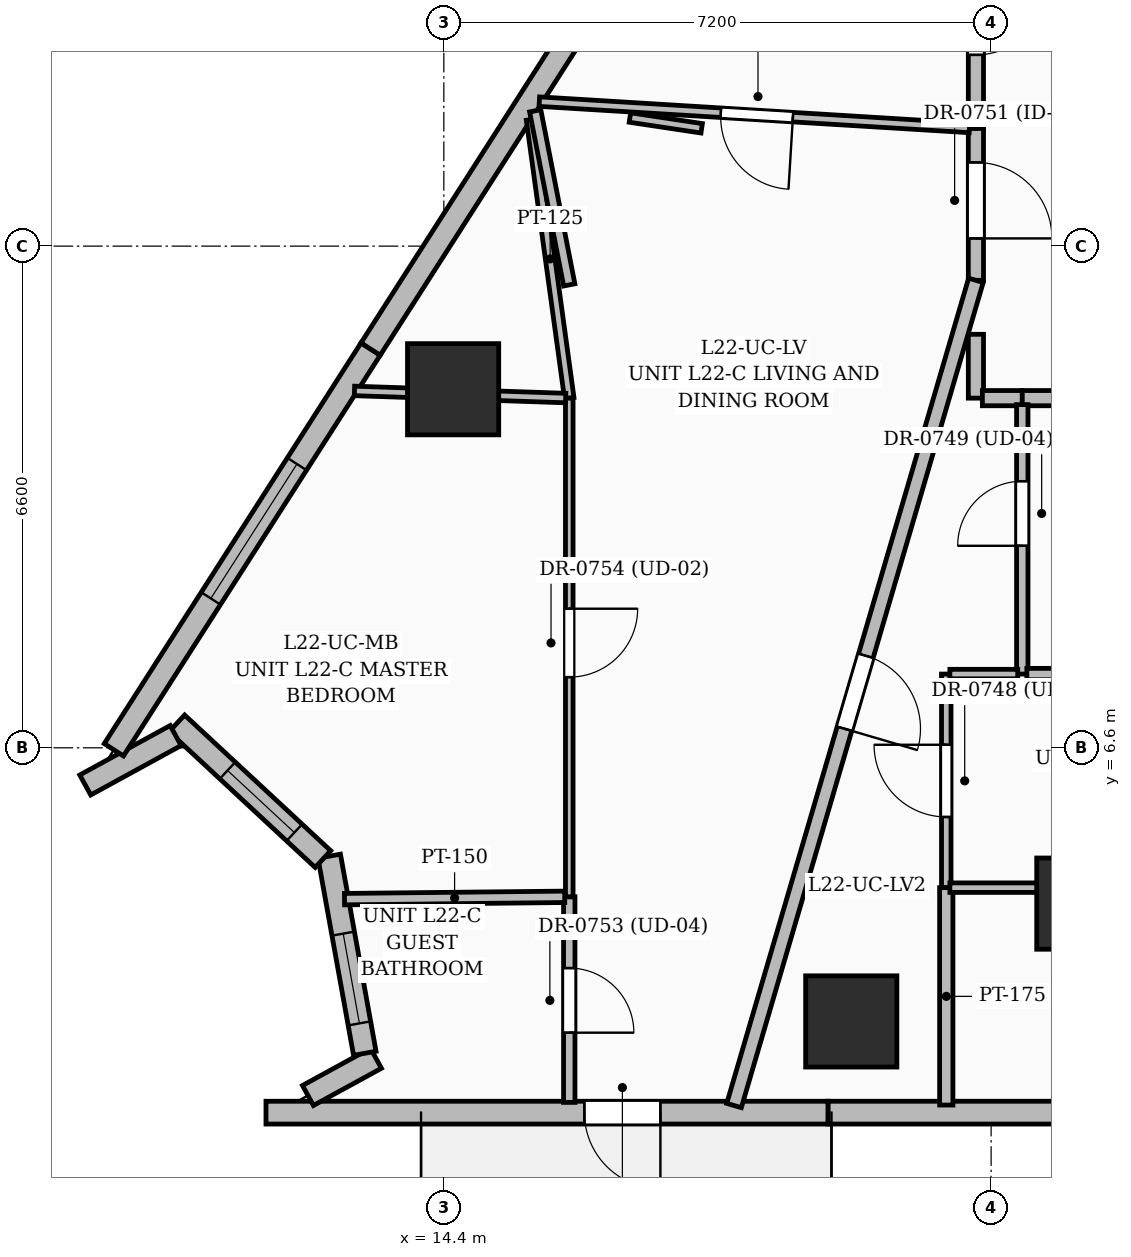
"""IFC4 building model, lengths in metres.
Left out: names, types, materials, properties, quantities, classifications, styles, units other than length and angle.
Written with IfcOpenShell. Run it as: python <this file> out.ifc"""

import sys

from ifc_helpers import new_model, si_unit, direction, frame, frame_2d, origin, origin_2d, place, context, subcontext, project, spatial, rectangle, extrude, element, fill, save


model = new_model("IFC4")
c1 = context("Model", 3, precision=1e-05, world=origin(), true_north=direction((0.0, 1.0)))
c2 = subcontext(c1, "Body", "Model", "MODEL_VIEW")
j1 = project(units=[si_unit("LENGTHUNIT", "METRE"), si_unit("PLANEANGLEUNIT", "RADIAN")], contexts=[c1])
p1 = place(None, origin())
s1 = spatial("IfcSite", under=j1, at=p1, CompositionType="ELEMENT")
p2 = place(p1, origin())
s2 = spatial("IfcBuilding", under=s1, at=p2, CompositionType="ELEMENT")
p3 = place(p2, frame((0.0, 0.0, 89.4)))
s3 = spatial("IfcBuildingStorey", under=s2, at=p3, CompositionType="ELEMENT", Elevation=89.4)
for number, where, z_axis, x_axis in (
    (1, (22.8, 4.55, 0.0), (0.0, 0.0, 1.0), (1.0, 0.0, 0.0)),
    (2, (19.76, 3.0, 0.0), (0.0, 0.0, 1.0), (1.0, 0.0, 0.0)),
    (3, (14.522, 11.317, 0.0), (0.0, 0.0, 1.0), (1.0, 0.0, 0.0)),
):
    element("IfcColumn", number, at=place(p3, frame(where, z_axis=z_axis, x_axis=x_axis)), inside=s3, PredefinedType="COLUMN", context=c2, shape_type="SweptSolid", body=[
        extrude(rectangle(XDim=1.2, YDim=1.2, at=origin_2d()), origin(), (0.0, 0.0, 1.0), 3.6),
    ])
p4 = place(p3, frame((26.847, 1.8, 0.0), z_axis=(0.0, 0.0, 1.0), x_axis=(-1.0, 0.0, 0.0)))
e4 = element("IfcWall", 4, at=p4, inside=s3, PredefinedType="SOLIDWALL", context=c2, shape_type="SweptSolid", body=[
    extrude(rectangle(XDim=7.393, YDim=0.3, at=frame_2d((3.697, 0.0))), origin(), (0.0, 0.0, 1.0), 3.35),
])
p5 = place(p4, frame((1.975, 0.0, 0.55)))
e5 = element("IfcOpeningElement", 5, at=p5, cuts=e4, PredefinedType="OPENING", context=c2, shape_type="SweptSolid", body=[
    extrude(rectangle(XDim=2.1, YDim=2.4, at=frame_2d((1.05, 1.2))), frame((0.0, 0.16, 0.0), z_axis=(0.0, -1.0, 0.0), x_axis=(1.0, 0.0, 0.0)), (0.0, 0.0, 1.0), 0.32),
])
p6 = place(p3, frame((19.453, 1.8, 0.0), z_axis=(0.0, 0.0, 1.0), x_axis=(-1.0, 0.0, 0.0)))
e6 = element("IfcWall", 6, at=p6, inside=s3, PredefinedType="SOLIDWALL", context=c2, shape_type="SweptSolid", body=[
    extrude(rectangle(XDim=7.393, YDim=0.3, at=frame_2d((3.697, 0.0))), origin(), (0.0, 0.0, 1.0), 3.35),
])
p7 = place(p6, frame((2.204, 0.0, 0.0)))
e7 = element("IfcOpeningElement", 7, at=p7, cuts=e6, PredefinedType="OPENING", context=c2, shape_type="SweptSolid", body=[
    extrude(rectangle(XDim=1.0, YDim=2.2, at=frame_2d((0.5, 1.1))), frame((0.0, 0.16, 0.0), z_axis=(0.0, -1.0, 0.0), x_axis=(1.0, 0.0, 0.0)), (0.0, 0.0, 1.0), 0.32),
])
p8 = place(p3, frame((12.612, 2.026, 0.0), z_axis=(0.0, 0.0, 1.0), x_axis=(0.877245120991, 0.480042704036, 0.0)))
e8 = element("IfcWall", 8, at=p8, inside=s3, PredefinedType="SOLIDWALL", context=c2, shape_type="SweptSolid", body=[
    extrude(rectangle(XDim=1.02, YDim=0.3, at=frame_2d((0.51, 0.0))), origin(), (0.0, 0.0, 1.0), 3.35),
])
p9 = place(p3, frame((13.36, 2.581, 0.0), z_axis=(0.0, 0.0, 1.0), x_axis=(-0.177621463404, 0.984098885142, 0.0)))
e9 = element("IfcWall", 9, at=p9, inside=s3, PredefinedType="SOLIDWALL", context=c2, shape_type="SweptSolid", body=[
    extrude(rectangle(XDim=2.635, YDim=0.3, at=frame_2d((1.317, 0.0))), origin(), (0.0, 0.0, 1.0), 3.35),
])
p10 = place(p9, frame((0.4, 0.0, 0.8)))
e10 = element("IfcOpeningElement", 10, at=p10, cuts=e9, PredefinedType="OPENING", context=c2, shape_type="SweptSolid", body=[
    extrude(rectangle(XDim=1.2, YDim=1.8, at=frame_2d((0.6, 0.9))), frame((0.0, 0.16, 0.0), z_axis=(0.0, -1.0, 0.0), x_axis=(1.0, 0.0, 0.0)), (0.0, 0.0, 1.0), 0.32),
])
p11 = place(p3, frame((12.809, 5.136, 0.0), z_axis=(0.0, 0.0, 1.0), x_axis=(-0.732640992678, 0.680615292105, 0.0)))
e11 = element("IfcWall", 11, at=p11, inside=s3, PredefinedType="SOLIDWALL", context=c2, shape_type="SweptSolid", body=[
    extrude(rectangle(XDim=2.623, YDim=0.3, at=frame_2d((1.312, 0.0))), origin(), (0.0, 0.0, 1.0), 3.35),
])
p12 = place(p11, frame((0.513, 0.0, 0.8)))
e12 = element("IfcOpeningElement", 12, at=p12, cuts=e11, PredefinedType="OPENING", context=c2, shape_type="SweptSolid", body=[
    extrude(rectangle(XDim=1.2, YDim=1.8, at=frame_2d((0.6, 0.9))), frame((0.0, 0.16, 0.0), z_axis=(0.0, -1.0, 0.0), x_axis=(1.0, 0.0, 0.0)), (0.0, 0.0, 1.0), 0.32),
])
p13 = place(p3, frame((10.872, 6.761, 0.0), z_axis=(0.0, 0.0, 1.0), x_axis=(-0.877399567967, -0.479760354898, 0.0)))
e13 = element("IfcWall", 13, at=p13, inside=s3, PredefinedType="SOLIDWALL", context=c2, shape_type="SweptSolid", body=[
    extrude(rectangle(XDim=1.356, YDim=0.3, at=frame_2d((0.678, 0.0))), origin(), (0.0, 0.0, 1.0), 3.35),
])
p14 = place(p3, frame((10.059, 6.574, 0.0), z_axis=(0.0, 0.0, 1.0), x_axis=(0.539474072839, 0.842002211835, 0.0)))
e14 = element("IfcWall", 14, at=p14, inside=s3, PredefinedType="SOLIDWALL", context=c2, shape_type="SweptSolid", body=[
    extrude(rectangle(XDim=6.261, YDim=0.3, at=frame_2d((3.131, 0.0))), origin(), (0.0, 0.0, 1.0), 3.35),
])
p15 = place(p14, frame((2.365, 0.0, 0.55)))
e15 = element("IfcOpeningElement", 15, at=p15, cuts=e14, PredefinedType="OPENING", context=c2, shape_type="SweptSolid", body=[
    extrude(rectangle(XDim=2.1, YDim=2.4, at=frame_2d((1.05, 1.2))), frame((0.0, 0.16, 0.0), z_axis=(0.0, -1.0, 0.0), x_axis=(1.0, 0.0, 0.0)), (0.0, 0.0, 1.0), 0.32),
])
p16 = place(p3, frame((13.437, 11.846, 0.0), z_axis=(0.0, 0.0, 1.0), x_axis=(0.539467581629, 0.842006370743, 0.0)))
e16 = element("IfcWall", 16, at=p16, inside=s3, PredefinedType="SOLIDWALL", context=c2, shape_type="SweptSolid", body=[
    extrude(rectangle(XDim=7.13, YDim=0.3, at=frame_2d((3.565, 0.0))), origin(), (0.0, 0.0, 1.0), 3.35),
])
p17 = place(p3, frame((21.4, 12.04, 0.0), z_axis=(0.0, 0.0, 1.0), x_axis=(0.0, -1.0, 0.0)))
e17 = element("IfcWall", 17, at=p17, inside=s3, PredefinedType="PARTITIONING", context=c2, shape_type="SweptSolid", body=[
    extrude(rectangle(XDim=0.84, YDim=0.2, at=frame_2d((0.42, 0.0))), origin(), (0.0, 0.0, 1.0), 3.35),
])
p18 = place(p3, frame((21.485, 11.2, 0.0), z_axis=(0.0, 0.0, 1.0), x_axis=(1.0, 0.0, 0.0)))
e18 = element("IfcWall", 18, at=p18, inside=s3, PredefinedType="PARTITIONING", context=c2, shape_type="SweptSolid", body=[
    extrude(rectangle(XDim=0.525, YDim=0.2, at=frame_2d((0.262, 0.0))), origin(), (0.0, 0.0, 1.0), 3.35),
])
p19 = place(p3, frame((22.01, 11.2, 0.0), z_axis=(0.0, 0.0, 1.0), x_axis=(1.0, 0.0, 0.0)))
e19 = element("IfcWall", 19, at=p19, inside=s3, PredefinedType="PARTITIONING", context=c2, shape_type="SweptSolid", body=[
    extrude(rectangle(XDim=2.859, YDim=0.2, at=frame_2d((1.43, 0.0))), origin(), (0.0, 0.0, 1.0), 3.35),
])
p20 = place(p3, frame((21.4, 14.75, 0.0), z_axis=(0.0, 0.0, 1.0), x_axis=(0.0, -1.0, 0.0)))
e20 = element("IfcWall", 20, at=p20, inside=s3, PredefinedType="PARTITIONING", context=c2, shape_type="SweptSolid", body=[
    extrude(rectangle(XDim=2.0, YDim=0.2, at=frame_2d((1.0, 0.0))), origin(), (0.0, 0.0, 1.0), 2.771),
])
p21 = place(p20, frame((0.448, 0.0, 0.0)))
e21 = element("IfcOpeningElement", 21, at=p21, cuts=e20, PredefinedType="OPENING", context=c2, shape_type="SweptSolid", body=[
    extrude(rectangle(XDim=1.0, YDim=2.2, at=frame_2d((0.5, 1.1))), frame((0.0, 0.11, 0.0), z_axis=(0.0, -1.0, 0.0), x_axis=(1.0, 0.0, 0.0)), (0.0, 0.0, 1.0), 0.22),
])
p22 = place(p3, frame((21.4, 17.75, 0.0), z_axis=(0.0, 0.0, 1.0), x_axis=(0.0, -1.0, 0.0)))
e22 = element("IfcWall", 22, at=p22, inside=s3, PredefinedType="PARTITIONING", context=c2, shape_type="SweptSolid", body=[
    extrude(rectangle(XDim=3.0, YDim=0.2, at=frame_2d((1.5, 0.0))), origin(), (0.0, 0.0, 1.0), 2.771),
])
p23 = place(p22, frame((1.084, 0.0, 0.0)))
e23 = element("IfcOpeningElement", 23, at=p23, cuts=e22, PredefinedType="OPENING", context=c2, shape_type="SweptSolid", body=[
    extrude(rectangle(XDim=0.95, YDim=2.2, at=frame_2d((0.475, 1.1))), frame((0.0, 0.11, 0.0), z_axis=(0.0, -1.0, 0.0), x_axis=(1.0, 0.0, 0.0)), (0.0, 0.0, 1.0), 0.22),
])
p24 = place(p3, frame((22.01, 7.57, 0.0), z_axis=(0.0, 0.0, 1.0), x_axis=(0.0, 1.0, 0.0)))
e24 = element("IfcWall", 24, at=p24, inside=s3, PredefinedType="PARTITIONING", context=c2, shape_type="SweptSolid", body=[
    extrude(rectangle(XDim=3.545, YDim=0.15, at=frame_2d((1.772, 0.0))), origin(), (0.0, 0.0, 1.0), 2.345),
])
p25 = place(p24, frame((1.688, 0.0, 0.0)))
e25 = element("IfcOpeningElement", 25, at=p25, cuts=e24, PredefinedType="OPENING", context=c2, shape_type="SweptSolid", body=[
    extrude(rectangle(XDim=0.85, YDim=2.1, at=frame_2d((0.425, 1.05))), frame((0.0, 0.085, 0.0), z_axis=(0.0, -1.0, 0.0), x_axis=(1.0, 0.0, 0.0)), (0.0, 0.0, 1.0), 0.17),
])
p26 = place(p3, frame((21.01, 4.76, 0.0), z_axis=(0.0, 0.0, 1.0), x_axis=(0.0, 1.0, 0.0)))
e26 = element("IfcWall", 26, at=p26, inside=s3, PredefinedType="PARTITIONING", context=c2, shape_type="SweptSolid", body=[
    extrude(rectangle(XDim=2.81, YDim=0.125, at=frame_2d((1.405, 0.0))), origin(), (0.0, 0.0, 1.0), 3.35),
])
p27 = place(p26, frame((0.93, 0.0, 0.0)))
e27 = element("IfcOpeningElement", 27, at=p27, cuts=e26, PredefinedType="OPENING", context=c2, shape_type="SweptSolid", body=[
    extrude(rectangle(XDim=0.95, YDim=2.2, at=frame_2d((0.475, 1.1))), frame((0.0, 0.072, 0.0), z_axis=(0.0, -1.0, 0.0), x_axis=(1.0, 0.0, 0.0)), (0.0, 0.0, 1.0), 0.145),
])
p28 = place(p3, frame((21.058, 7.57, 0.0), z_axis=(0.0, 0.0, 1.0), x_axis=(1.0, 0.0, 0.0)))
e28 = element("IfcWall", 28, at=p28, inside=s3, PredefinedType="PARTITIONING", context=c2, shape_type="SweptSolid", body=[
    extrude(rectangle(XDim=0.892, YDim=0.125, at=frame_2d((0.446, 0.0))), origin(), (0.0, 0.0, 1.0), 2.771),
])
p29 = place(p3, frame((21.01, 1.9, 0.0), z_axis=(0.0, 0.0, 1.0), x_axis=(0.0, 1.0, 0.0)))
e29 = element("IfcWall", 29, at=p29, inside=s3, PredefinedType="PARTITIONING", context=c2, shape_type="SweptSolid", body=[
    extrude(rectangle(XDim=2.86, YDim=0.175, at=frame_2d((1.43, 0.0))), origin(), (0.0, 0.0, 1.0), 2.345),
])
p30 = place(p3, frame((21.4, 12.75, 0.0), z_axis=(0.0, 0.0, 1.0), x_axis=(-0.281267694056, -0.959629347342, 0.0)))
e30 = element("IfcWall", 30, at=p30, inside=s3, PredefinedType="PARTITIONING", context=c2, shape_type="SweptSolid", body=[
    extrude(rectangle(XDim=11.313, YDim=0.2, at=frame_2d((5.656, 0.0))), origin(), (0.0, 0.0, 1.0), 2.345),
])
p31 = place(p30, frame((5.147, 0.0, 0.0)))
e31 = element("IfcOpeningElement", 31, at=p31, cuts=e30, PredefinedType="OPENING", context=c2, shape_type="SweptSolid", body=[
    extrude(rectangle(XDim=1.0, YDim=2.2, at=frame_2d((0.5, 1.1))), frame((0.0, 0.11, 0.0), z_axis=(0.0, -1.0, 0.0), x_axis=(1.0, 0.0, 0.0)), (0.0, 0.0, 1.0), 0.22),
])
p32 = place(p3, frame((22.07, 7.57, 0.0), z_axis=(0.0, 0.0, 1.0), x_axis=(1.0, 0.0, 0.0)))
e32 = element("IfcWall", 32, at=p32, inside=s3, PredefinedType="PARTITIONING", context=c2, shape_type="SweptSolid", body=[
    extrude(rectangle(XDim=2.795, YDim=0.15, at=frame_2d((1.397, 0.0))), origin(), (0.0, 0.0, 1.0), 3.35),
])
p33 = place(p3, frame((21.058, 4.76, 0.0), z_axis=(0.0, 0.0, 1.0), x_axis=(1.0, 0.0, 0.0)))
e33 = element("IfcWall", 33, at=p33, inside=s3, PredefinedType="PARTITIONING", context=c2, shape_type="SweptSolid", body=[
    extrude(rectangle(XDim=6.042, YDim=0.125, at=frame_2d((3.021, 0.0))), origin(), (0.0, 0.0, 1.0), 2.309),
])
p34 = place(p33, frame((2.488, 0.0, 0.0)))
e34 = element("IfcOpeningElement", 34, at=p34, cuts=e33, PredefinedType="OPENING", context=c2, shape_type="SweptSolid", body=[
    extrude(rectangle(XDim=0.9, YDim=2.15, at=frame_2d((0.45, 1.075))), frame((0.0, 0.072, 0.0), z_axis=(0.0, -1.0, 0.0), x_axis=(1.0, 0.0, 0.0)), (0.0, 0.0, 1.0), 0.145),
])
p35 = place(p3, frame((16.05, 4.64, 0.0), z_axis=(0.0, 0.0, 1.0), x_axis=(0.0, -1.0, 0.0)))
e35 = element("IfcWall", 35, at=p35, inside=s3, PredefinedType="PARTITIONING", context=c2, shape_type="SweptSolid", body=[
    extrude(rectangle(XDim=2.705, YDim=0.15, at=frame_2d((1.353, 0.0))), origin(), (0.0, 0.0, 1.0), 3.35),
])
p36 = place(p35, frame((0.938, 0.0, 0.0)))
e36 = element("IfcOpeningElement", 36, at=p36, cuts=e35, PredefinedType="OPENING", context=c2, shape_type="SweptSolid", body=[
    extrude(rectangle(XDim=0.85, YDim=2.1, at=frame_2d((0.425, 1.05))), frame((0.0, 0.085, 0.0), z_axis=(0.0, -1.0, 0.0), x_axis=(1.0, 0.0, 0.0)), (0.0, 0.0, 1.0), 0.17),
])
p37 = place(p3, frame((21.315, 14.755, 0.0), z_axis=(0.0, 0.0, 1.0), x_axis=(-0.99813414118, 0.061059284391, 0.0)))
e37 = element("IfcWall", 37, at=p37, inside=s3, PredefinedType="PARTITIONING", context=c2, shape_type="SweptSolid", body=[
    extrude(rectangle(XDim=5.67, YDim=0.125, at=frame_2d((2.835, 0.0))), origin(), (0.0, 0.0, 1.0), 2.37),
])
p38 = place(p37, frame((2.327, 0.0, 0.0)))
e38 = element("IfcOpeningElement", 38, at=p38, cuts=e37, PredefinedType="OPENING", context=c2, shape_type="SweptSolid", body=[
    extrude(rectangle(XDim=0.95, YDim=2.2, at=frame_2d((0.475, 1.1))), frame((0.0, 0.072, 0.0), z_axis=(0.0, -1.0, 0.0), x_axis=(1.0, 0.0, 0.0)), (0.0, 0.0, 1.0), 0.145),
])
p39 = place(p3, frame((15.547, 14.865, 0.0), z_axis=(0.0, 0.0, 1.0), x_axis=(0.135967318148, -0.990713323013, 0.0)))
e39 = element("IfcWall", 39, at=p39, inside=s3, PredefinedType="PARTITIONING", context=c2, shape_type="SweptSolid", body=[
    extrude(rectangle(XDim=3.699, YDim=0.125, at=frame_2d((1.85, 0.0))), origin(), (0.0, 0.0, 1.0), 2.37),
])
p40 = place(p3, frame((16.05, 11.2, 0.0), z_axis=(0.0, 0.0, 1.0), x_axis=(0.0, -1.0, 0.0)))
e40 = element("IfcWall", 40, at=p40, inside=s3, PredefinedType="PARTITIONING", context=c2, shape_type="SweptSolid", body=[
    extrude(rectangle(XDim=6.56, YDim=0.1, at=frame_2d((3.28, 0.0))), origin(), (0.0, 0.0, 1.0), 2.345),
])
p41 = place(p40, frame((2.77, 0.0, 0.0)))
e41 = element("IfcOpeningElement", 41, at=p41, cuts=e40, PredefinedType="OPENING", context=c2, shape_type="SweptSolid", body=[
    extrude(rectangle(XDim=0.9, YDim=2.15, at=frame_2d((0.45, 1.075))), frame((0.0, 0.06, 0.0), z_axis=(0.0, -1.0, 0.0), x_axis=(1.0, 0.0, 0.0)), (0.0, 0.0, 1.0), 0.12),
])
p42 = place(p3, frame((15.99, 4.639, 0.0), z_axis=(0.0, 0.0, 1.0), x_axis=(-0.999944518883, -0.010533715225, 0.0)))
e42 = element("IfcWall", 42, at=p42, inside=s3, PredefinedType="PARTITIONING", context=c2, shape_type="SweptSolid", body=[
    extrude(rectangle(XDim=2.897, YDim=0.15, at=frame_2d((1.449, 0.0))), origin(), (0.0, 0.0, 1.0), 3.35),
])
p43 = place(p3, frame((13.224, 11.295, 0.0), z_axis=(0.0, 0.0, 1.0), x_axis=(0.999434133118, -0.033636491475, 0.0)))
e43 = element("IfcWall", 43, at=p43, inside=s3, PredefinedType="PARTITIONING", context=c2, shape_type="SweptSolid", body=[
    extrude(rectangle(XDim=2.78, YDim=0.125, at=frame_2d((1.39, 0.0))), origin(), (0.0, 0.0, 1.0), 2.345),
])
p44 = place(p3, frame((17.792, 14.75, 0.0), z_axis=(0.0, 0.0, 1.0), x_axis=(-0.988863080903, 0.14882811303, 0.0)))
e44 = element("IfcWall", 44, at=p44, inside=s3, PredefinedType="PARTITIONING", context=c2, shape_type="SweptSolid", body=[
    extrude(rectangle(XDim=0.955, YDim=0.125, at=frame_2d((0.478, 0.0))), origin(), (0.0, 0.0, 1.0), 2.37),
])
p45 = place(p3, frame((16.05, 12.69, 0.0), z_axis=(0.0, 0.0, 1.0), x_axis=(-0.191989700007, 0.981396940637, 0.0)))
e45 = element("IfcWall", 45, at=p45, inside=s3, PredefinedType="PARTITIONING", context=c2, shape_type="SweptSolid", body=[
    extrude(rectangle(XDim=2.333, YDim=0.15, at=frame_2d((1.167, 0.0))), origin(), (0.0, 0.0, 1.0), 2.37),
])
p46 = place(p7, origin())
e46 = element("IfcDoor", 46, at=p46, inside=s3, OperationType="SINGLE_SWING_LEFT", PredefinedType="DOOR", context=c2, shape_type="SweptSolid", body=[
    extrude(rectangle(XDim=1.0, YDim=2.2, at=frame_2d((0.5, 1.1))), frame((0.0, 0.025, 0.0), z_axis=(0.0, -1.0, 0.0), x_axis=(1.0, 0.0, 0.0)), (0.0, 0.0, 1.0), 0.05),
])
fill(e7, e46)
p47 = place(p10, origin())
e47 = element("IfcWindow", 47, at=p47, inside=s3, PartitioningType="SINGLE_PANEL", PredefinedType="WINDOW", context=c2, shape_type="SweptSolid", body=[
    extrude(rectangle(XDim=1.2, YDim=1.8, at=frame_2d((0.6, 0.9))), frame((0.0, 0.03, 0.0), z_axis=(0.0, -1.0, 0.0), x_axis=(1.0, 0.0, 0.0)), (0.0, 0.0, 1.0), 0.06),
])
fill(e10, e47)
p48 = place(p12, origin())
e48 = element("IfcWindow", 48, at=p48, inside=s3, PartitioningType="SINGLE_PANEL", PredefinedType="WINDOW", context=c2, shape_type="SweptSolid", body=[
    extrude(rectangle(XDim=1.2, YDim=1.8, at=frame_2d((0.6, 0.9))), frame((0.0, 0.03, 0.0), z_axis=(0.0, -1.0, 0.0), x_axis=(1.0, 0.0, 0.0)), (0.0, 0.0, 1.0), 0.06),
])
fill(e12, e48)
p49 = place(p15, origin())
e49 = element("IfcWindow", 49, at=p49, inside=s3, PartitioningType="SINGLE_PANEL", PredefinedType="WINDOW", context=c2, shape_type="SweptSolid", body=[
    extrude(rectangle(XDim=2.1, YDim=2.4, at=frame_2d((1.05, 1.2))), frame((0.0, 0.03, 0.0), z_axis=(0.0, -1.0, 0.0), x_axis=(1.0, 0.0, 0.0)), (0.0, 0.0, 1.0), 0.06),
])
fill(e15, e49)
p50 = place(p27, origin())
e50 = element("IfcDoor", 50, at=p50, inside=s3, OperationType="SINGLE_SWING_RIGHT", PredefinedType="DOOR", context=c2, shape_type="SweptSolid", body=[
    extrude(rectangle(XDim=0.95, YDim=2.2, at=frame_2d((0.475, 1.1))), frame((0.0, 0.025, 0.0), z_axis=(0.0, -1.0, 0.0), x_axis=(1.0, 0.0, 0.0)), (0.0, 0.0, 1.0), 0.05),
])
fill(e27, e50)
p51 = place(p25, origin())
e51 = element("IfcDoor", 51, at=p51, inside=s3, OperationType="SINGLE_SWING_LEFT", PredefinedType="DOOR", context=c2, shape_type="SweptSolid", body=[
    extrude(rectangle(XDim=0.85, YDim=2.1, at=frame_2d((0.425, 1.05))), frame((0.0, 0.025, 0.0), z_axis=(0.0, -1.0, 0.0), x_axis=(1.0, 0.0, 0.0)), (0.0, 0.0, 1.0), 0.05),
])
fill(e25, e51)
p52 = place(p21, origin())
e52 = element("IfcDoor", 52, at=p52, inside=s3, OperationType="SINGLE_SWING_RIGHT", PredefinedType="DOOR", context=c2, shape_type="SweptSolid", body=[
    extrude(rectangle(XDim=1.0, YDim=2.2, at=frame_2d((0.5, 1.1))), frame((0.0, 0.025, 0.0), z_axis=(0.0, -1.0, 0.0), x_axis=(1.0, 0.0, 0.0)), (0.0, 0.0, 1.0), 0.05),
])
fill(e21, e52)
p53 = place(p38, origin())
e53 = element("IfcDoor", 53, at=p53, inside=s3, OperationType="SINGLE_SWING_LEFT", PredefinedType="DOOR", context=c2, shape_type="SweptSolid", body=[
    extrude(rectangle(XDim=0.95, YDim=2.2, at=frame_2d((0.475, 1.1))), frame((0.0, 0.025, 0.0), z_axis=(0.0, -1.0, 0.0), x_axis=(1.0, 0.0, 0.0)), (0.0, 0.0, 1.0), 0.05),
])
fill(e38, e53)
p54 = place(p36, origin())
e54 = element("IfcDoor", 54, at=p54, inside=s3, OperationType="SINGLE_SWING_RIGHT", PredefinedType="DOOR", context=c2, shape_type="SweptSolid", body=[
    extrude(rectangle(XDim=0.85, YDim=2.1, at=frame_2d((0.425, 1.05))), frame((0.0, 0.025, 0.0), z_axis=(0.0, -1.0, 0.0), x_axis=(1.0, 0.0, 0.0)), (0.0, 0.0, 1.0), 0.05),
])
fill(e36, e54)
p55 = place(p41, origin())
e55 = element("IfcDoor", 55, at=p55, inside=s3, OperationType="SINGLE_SWING_LEFT", PredefinedType="DOOR", context=c2, shape_type="SweptSolid", body=[
    extrude(rectangle(XDim=0.9, YDim=2.15, at=frame_2d((0.45, 1.075))), frame((0.0, 0.025, 0.0), z_axis=(0.0, -1.0, 0.0), x_axis=(1.0, 0.0, 0.0)), (0.0, 0.0, 1.0), 0.05),
])
fill(e41, e55)
p56 = place(p31, origin())
e56 = element("IfcDoor", 56, at=p56, inside=s3, OperationType="SINGLE_SWING_RIGHT", PredefinedType="DOOR", context=c2, shape_type="SweptSolid", body=[
    extrude(rectangle(XDim=1.0, YDim=2.2, at=frame_2d((0.5, 1.1))), frame((0.0, 0.025, 0.0), z_axis=(0.0, -1.0, 0.0), x_axis=(1.0, 0.0, 0.0)), (0.0, 0.0, 1.0), 0.05),
])
fill(e31, e56)
p57 = place(p23, origin())
e57 = element("IfcDoor", 57, at=p57, inside=s3, OperationType="SINGLE_SWING_LEFT", PredefinedType="DOOR", context=c2, shape_type="SweptSolid", body=[
    extrude(rectangle(XDim=0.95, YDim=2.2, at=frame_2d((0.475, 1.1))), frame((0.0, 0.025, 0.0), z_axis=(0.0, -1.0, 0.0), x_axis=(1.0, 0.0, 0.0)), (0.0, 0.0, 1.0), 0.05),
])
fill(e23, e57)
save(model, sys.argv[1])
